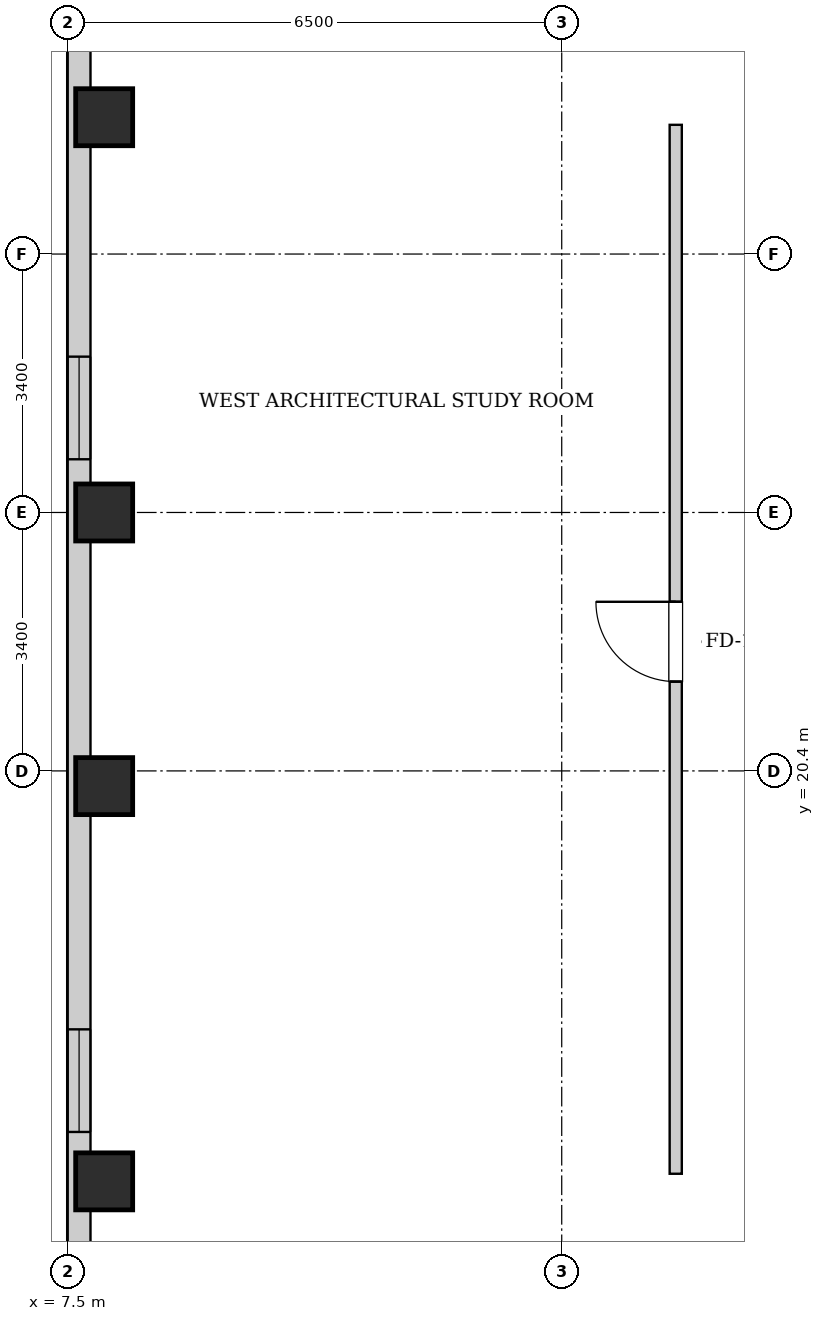
"""IFC4 building model, lengths in metres.
Left out: names, types, materials, properties, quantities, classifications, styles, units other than length and angle.
Written with IfcOpenShell. Run it as: python <this file> out.ifc"""

import sys

from ifc_helpers import new_model, si_unit, direction, frame, frame_2d, origin, origin_2d, place, context, subcontext, project, spatial, rectangle, extrude, element, fill, save


model = new_model("IFC4")
c1 = context("Model", 3, precision=1e-05, world=origin(), true_north=direction((0.0, 1.0)))
c2 = subcontext(c1, "Body", "Model", "MODEL_VIEW")
j1 = project(units=[si_unit("LENGTHUNIT", "METRE"), si_unit("PLANEANGLEUNIT", "RADIAN")], contexts=[c1])
p1 = place(None, origin())
s1 = spatial("IfcSite", under=j1, at=p1, CompositionType="ELEMENT")
p2 = place(p1, origin())
s2 = spatial("IfcBuilding", under=s1, at=p2, CompositionType="ELEMENT")
p3 = place(p2, frame((0.0, 0.0, 124.4)))
s3 = spatial("IfcBuildingStorey", under=s2, at=p3, CompositionType="ELEMENT", Elevation=124.4)
for number, where, z_axis, x_axis in (
    (1, (7.98, 15.0, 0.0), (0.0, 0.0, 1.0), (1.0, 0.0, 0.0)),
    (2, (7.98, 20.2, 0.0), (0.0, 0.0, 1.0), (1.0, 0.0, 0.0)),
    (3, (7.98, 23.8, 0.0), (0.0, 0.0, 1.0), (1.0, 0.0, 0.0)),
    (4, (7.98, 29.0, 0.0), (0.0, 0.0, 1.0), (1.0, 0.0, 0.0)),
):
    element("IfcColumn", number, at=place(p3, frame(where, z_axis=z_axis, x_axis=x_axis)), inside=s3, PredefinedType="COLUMN", context=c2, shape_type="SweptSolid", body=[
        extrude(rectangle(XDim=0.75, YDim=0.75, at=origin_2d()), origin(), (0.0, 0.0, 1.0), 3.25),
    ])
p4 = place(p3, frame((7.65, 6.3, 0.0), z_axis=(0.0, 0.0, 1.0), x_axis=(0.0, 1.0, 0.0)))
e5 = element("IfcWall", 5, at=p4, inside=s3, PredefinedType="SOLIDWALL", context=c2, shape_type="SweptSolid", body=[
    extrude(rectangle(XDim=34.5, YDim=0.3, at=frame_2d((17.25, 0.0))), origin(), (0.0, 0.0, 1.0), 2.99),
])
p5 = place(p4, frame((18.2, 0.0, 0.55)))
e6 = element("IfcOpeningElement", 6, at=p5, cuts=e5, PredefinedType="OPENING", context=c2, shape_type="SweptSolid", body=[
    extrude(rectangle(XDim=1.35, YDim=1.2, at=frame_2d((0.675, 0.6))), frame((0.0, 0.16, 0.0), z_axis=(0.0, -1.0, 0.0), x_axis=(1.0, 0.0, 0.0)), (0.0, 0.0, 1.0), 0.32),
])
p6 = place(p4, frame((9.35, 0.0, 0.55)))
e7 = element("IfcOpeningElement", 7, at=p6, cuts=e5, PredefinedType="OPENING", context=c2, shape_type="SweptSolid", body=[
    extrude(rectangle(XDim=1.35, YDim=1.2, at=frame_2d((0.675, 0.6))), frame((0.0, 0.16, 0.0), z_axis=(0.0, -1.0, 0.0), x_axis=(1.0, 0.0, 0.0)), (0.0, 0.0, 1.0), 0.32),
])
p7 = place(p3, frame((15.5, 15.1, 0.0), z_axis=(0.0, 0.0, 1.0), x_axis=(0.0, 1.0, 0.0)))
e8 = element("IfcWall", 8, at=p7, inside=s3, PredefinedType="PARTITIONING", context=c2, shape_type="SweptSolid", body=[
    extrude(rectangle(XDim=13.8, YDim=0.16, at=frame_2d((6.9, 0.0))), origin(), (0.0, 0.0, 1.0), 2.99),
])
p8 = place(p7, frame((6.475, 0.0, 0.0)))
e9 = element("IfcOpeningElement", 9, at=p8, cuts=e8, PredefinedType="OPENING", context=c2, shape_type="SweptSolid", body=[
    extrude(rectangle(XDim=1.05, YDim=2.05, at=frame_2d((0.525, 1.025))), frame((0.0, 0.09, 0.0), z_axis=(0.0, -1.0, 0.0), x_axis=(1.0, 0.0, 0.0)), (0.0, 0.0, 1.0), 0.18),
])
p9 = place(p8, origin())
e10 = element("IfcDoor", 10, at=p9, inside=s3, OperationType="SINGLE_SWING_RIGHT", PredefinedType="DOOR", context=c2, shape_type="SweptSolid", body=[
    extrude(rectangle(XDim=1.05, YDim=2.05, at=frame_2d((0.525, 1.025))), frame((0.0, 0.025, 0.0), z_axis=(0.0, -1.0, 0.0), x_axis=(1.0, 0.0, 0.0)), (0.0, 0.0, 1.0), 0.05),
])
fill(e9, e10)
p10 = place(p5, origin())
e11 = element("IfcWindow", 11, at=p10, inside=s3, PartitioningType="SINGLE_PANEL", PredefinedType="WINDOW", context=c2, shape_type="SweptSolid", body=[
    extrude(rectangle(XDim=1.35, YDim=1.2, at=frame_2d((0.675, 0.6))), frame((0.0, 0.03, 0.0), z_axis=(0.0, -1.0, 0.0), x_axis=(1.0, 0.0, 0.0)), (0.0, 0.0, 1.0), 0.06),
])
fill(e6, e11)
p11 = place(p6, origin())
e12 = element("IfcWindow", 12, at=p11, inside=s3, PartitioningType="SINGLE_PANEL", PredefinedType="WINDOW", context=c2, shape_type="SweptSolid", body=[
    extrude(rectangle(XDim=1.35, YDim=1.2, at=frame_2d((0.675, 0.6))), frame((0.0, 0.03, 0.0), z_axis=(0.0, -1.0, 0.0), x_axis=(1.0, 0.0, 0.0)), (0.0, 0.0, 1.0), 0.06),
])
fill(e7, e12)
save(model, sys.argv[1])
